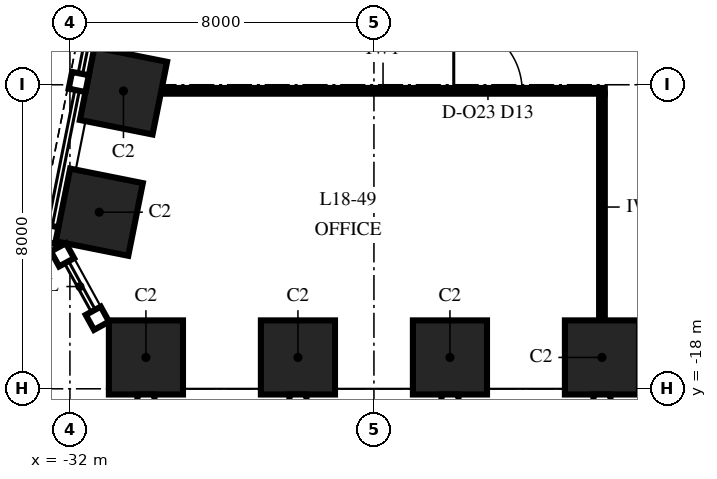
"""IFC4 building model, lengths in metres.
Left out: names, types, materials, properties, quantities, classifications, styles, units other than length and angle.
Written with IfcOpenShell. Run it as: python <this file> out.ifc"""

import sys

from ifc_helpers import new_model, si_unit, direction, frame, frame_2d, origin, origin_2d, place, context, subcontext, project, spatial, rectangle, extrude, element, fill, save


model = new_model("IFC4")
c1 = context("Model", 3, precision=1e-05, world=origin(), true_north=direction((0.0, 1.0)))
c2 = subcontext(c1, "Body", "Model", "MODEL_VIEW")
j1 = project(units=[si_unit("LENGTHUNIT", "METRE"), si_unit("PLANEANGLEUNIT", "RADIAN")], contexts=[c1])
p1 = place(None, origin())
s1 = spatial("IfcSite", under=j1, at=p1, CompositionType="ELEMENT")
p2 = place(p1, origin())
s2 = spatial("IfcBuilding", under=s1, at=p2, CompositionType="ELEMENT")
p3 = place(p2, frame((0.0, 0.0, 84.0)))
s3 = spatial("IfcBuildingStorey", under=s2, at=p3, CompositionType="ELEMENT", Elevation=84.0)
for number, where, z_axis, x_axis in (
    (1, (-30.0, -17.175, 0.0), (0.0, 0.0, 1.0), (1.0, 0.0, 0.0)),
    (2, (-26.0, -17.175, 0.0), (0.0, 0.0, 1.0), (1.0, 0.0, 0.0)),
    (3, (-22.0, -17.175, 0.0), (0.0, 0.0, 1.0), (1.0, 0.0, 0.0)),
    (4, (-18.0, -17.175, 0.0), (0.0, 0.0, 1.0), (1.0, 0.0, 0.0)),
    (5, (-30.591, -10.162, 0.0), (0.0, 0.0, 1.0), (-0.196, -0.981, 0.0)),
    (6, (-31.229, -13.353, 0.0), (0.0, 0.0, 1.0), (-0.196, -0.981, 0.0)),
):
    element("IfcColumn", number, at=place(p3, frame(where, z_axis=z_axis, x_axis=x_axis)), inside=s3, PredefinedType="COLUMN", context=c2, shape_type="SweptSolid", body=[
        extrude(rectangle(XDim=1.95, YDim=1.95, at=origin_2d()), origin(), (0.0, 0.0, 1.0), 4.0),
    ])
p4 = place(p3, frame((-29.596, -10.16, 0.0), z_axis=(0.0, 0.0, 1.0), x_axis=(1.0, 0.0, 0.0)))
e7 = element("IfcWall", 7, at=p4, inside=s3, PredefinedType="PARTITIONING", context=c2, shape_type="SweptSolid", body=[
    extrude(rectangle(XDim=11.671, YDim=0.15, at=frame_2d((5.836, 0.0))), origin(), (0.0, 0.0, 1.0), 3.25),
])
p5 = place(p4, frame((7.696, 0.0, 0.0)))
e8 = element("IfcOpeningElement", 8, at=p5, cuts=e7, PredefinedType="OPENING", context=c2, shape_type="SweptSolid", body=[
    extrude(rectangle(XDim=1.8, YDim=2.4, at=frame_2d((0.9, 1.2))), frame((0.0, 0.09, 0.0), z_axis=(0.0, -1.0, 0.0), x_axis=(1.0, 0.0, 0.0)), (0.0, 0.0, 1.0), 0.18),
])
p6 = place(p3, frame((-18.0, -16.2, 0.0), z_axis=(0.0, 0.0, 1.0), x_axis=(0.0, 1.0, 0.0)))
e9 = element("IfcWall", 9, at=p6, inside=s3, PredefinedType="PARTITIONING", context=c2, shape_type="SweptSolid", body=[
    extrude(rectangle(XDim=5.965, YDim=0.15, at=frame_2d((2.982, 0.0))), origin(), (0.0, 0.0, 1.0), 3.25),
])
p7 = place(p5, origin())
e10 = element("IfcDoor", 10, at=p7, inside=s3, OperationType="DOUBLE_DOOR_SINGLE_SWING", PredefinedType="DOOR", context=c2, shape_type="SweptSolid", body=[
    extrude(rectangle(XDim=1.8, YDim=2.4, at=frame_2d((0.9, 1.2))), frame((0.0, 0.075, 0.0), z_axis=(0.0, -1.0, 0.0), x_axis=(1.0, 0.0, 0.0)), (0.0, 0.0, 1.0), 0.149),
])
fill(e8, e10)
save(model, sys.argv[1])
